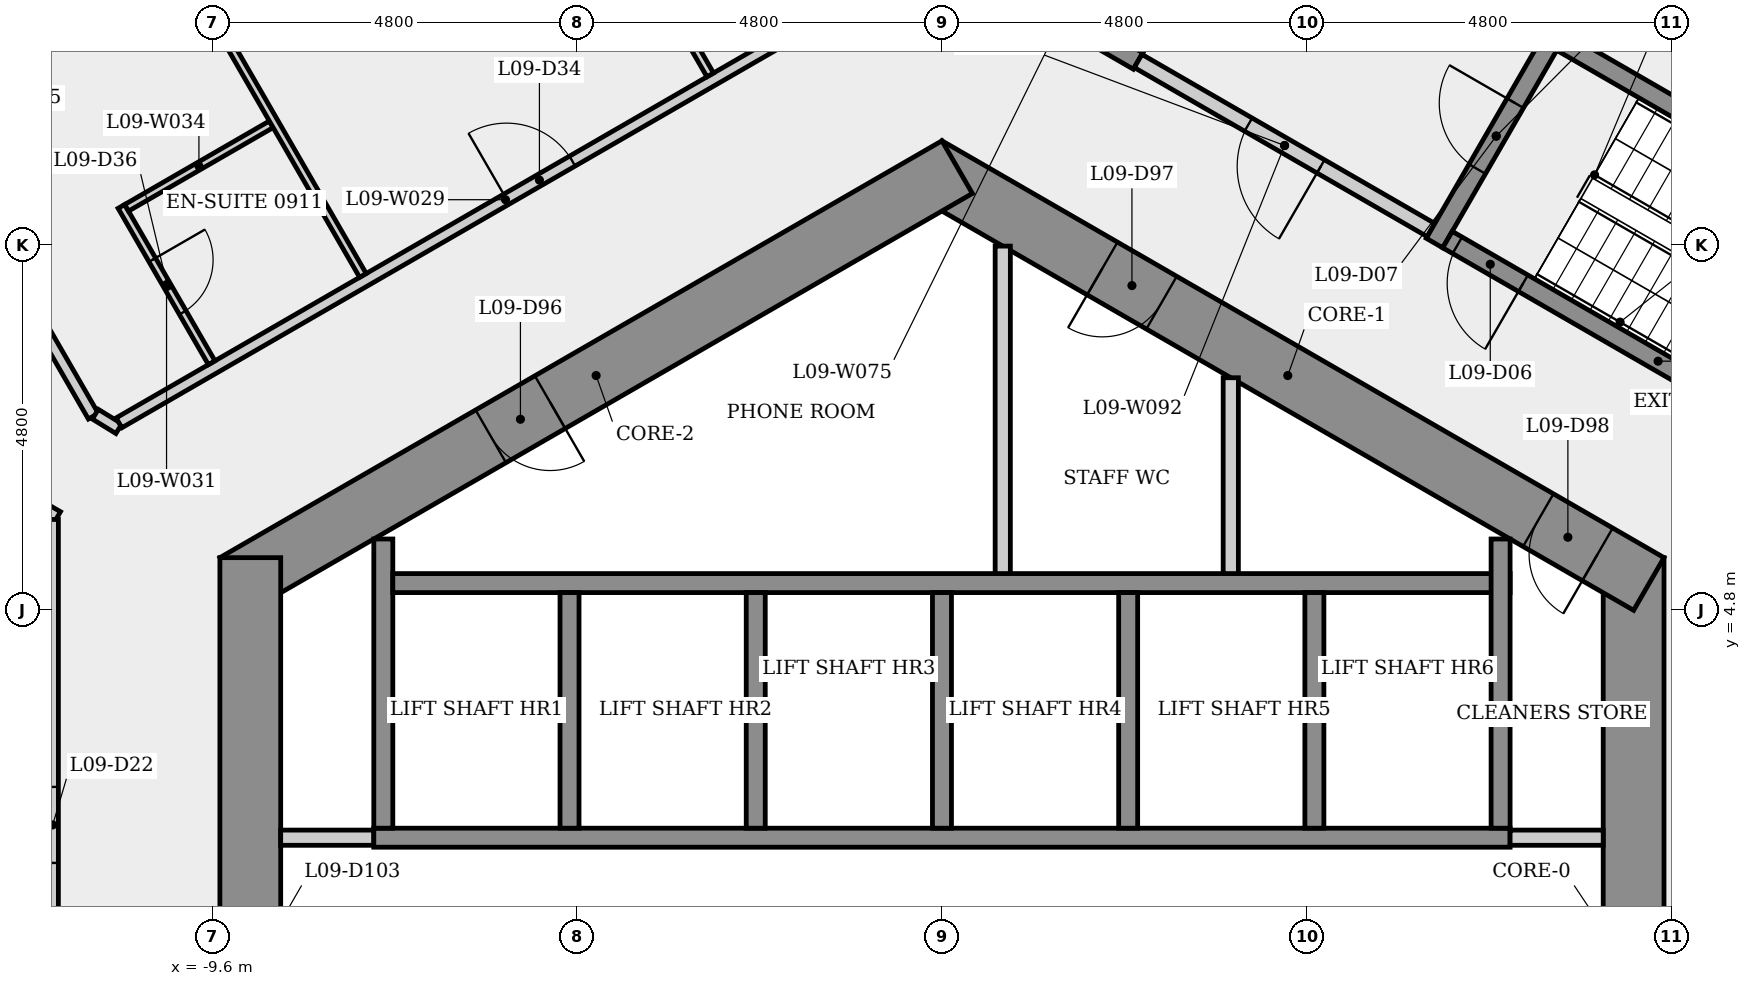
"""IFC4 building model, lengths in metres.
Left out: names, types, materials, properties, quantities, classifications, styles, units other than length and angle.
Written with IfcOpenShell. Run it as: python <this file> out.ifc"""

import sys

from ifc_helpers import new_model, si_unit, direction, frame, frame_2d, origin, place, context, subcontext, project, spatial, rectangle, extrude, element, fill, save


model = new_model("IFC4")
c1 = context("Model", 3, precision=1e-05, world=origin(), true_north=direction((0.0, 1.0)))
c2 = subcontext(c1, "Body", "Model", "MODEL_VIEW")
j1 = project(units=[si_unit("LENGTHUNIT", "METRE"), si_unit("PLANEANGLEUNIT", "RADIAN")], contexts=[c1])
p1 = place(None, origin())
s1 = spatial("IfcSite", under=j1, at=p1, CompositionType="ELEMENT")
p2 = place(p1, origin())
s2 = spatial("IfcBuilding", under=s1, at=p2, CompositionType="ELEMENT")
p3 = place(p2, frame((0.0, 0.0, 39.1)))
s3 = spatial("IfcBuildingStorey", under=s2, at=p3, CompositionType="ELEMENT", Elevation=39.1)
p4 = place(p3, frame((9.1, -5.485, 0.0), z_axis=(0.0, 0.0, 1.0), x_axis=(0.0, 1.0, 0.0)))
e1 = element("IfcWall", 1, at=p4, inside=s3, PredefinedType="SHEAR", context=c2, shape_type="SweptSolid", body=[
    extrude(rectangle(XDim=10.97, YDim=0.8, at=frame_2d((5.485, 0.0))), origin(), (0.0, 0.0, 1.0), 3.4),
])
p5 = place(p4, frame((4.685, 0.0, 0.0)))
e2 = element("IfcOpeningElement", 2, at=p5, cuts=e1, PredefinedType="OPENING", context=c2, shape_type="SweptSolid", body=[
    extrude(rectangle(XDim=1.6, YDim=2.1, at=frame_2d((0.8, 1.05))), frame((0.0, 0.41, 0.0), z_axis=(0.0, -1.0, 0.0), x_axis=(1.0, 0.0, 0.0)), (0.0, 0.0, 1.0), 0.82),
])
p6 = place(p3, frame((9.3, 5.138, 0.0), z_axis=(0.0, 0.0, 1.0), x_axis=(-0.866023993627, 0.500002442456, 0.0)))
e3 = element("IfcWall", 3, at=p6, inside=s3, PredefinedType="SHEAR", context=c2, shape_type="SweptSolid", body=[
    extrude(rectangle(XDim=10.97, YDim=0.8, at=frame_2d((5.485, 0.0))), origin(), (0.0, 0.0, 1.0), 3.4),
])
p7 = place(p6, frame((7.403, 0.0, 0.0)))
e4 = element("IfcOpeningElement", 4, at=p7, cuts=e3, PredefinedType="OPENING", context=c2, shape_type="SweptSolid", body=[
    extrude(rectangle(XDim=0.9, YDim=2.1, at=frame_2d((0.45, 1.05))), frame((0.0, 0.41, 0.0), z_axis=(0.0, -1.0, 0.0), x_axis=(1.0, 0.0, 0.0)), (0.0, 0.0, 1.0), 0.82),
])
p8 = place(p6, frame((0.78, 0.0, 0.0)))
e5 = element("IfcOpeningElement", 5, at=p8, cuts=e3, PredefinedType="OPENING", context=c2, shape_type="SweptSolid", body=[
    extrude(rectangle(XDim=0.9, YDim=2.1, at=frame_2d((0.45, 1.05))), frame((0.0, 0.41, 0.0), z_axis=(0.0, -1.0, 0.0), x_axis=(1.0, 0.0, 0.0)), (0.0, 0.0, 1.0), 0.82),
])
p9 = place(p3, frame((0.2, 10.623, 0.0), z_axis=(0.0, 0.0, 1.0), x_axis=(-0.866023993627, -0.500002442456, 0.0)))
e6 = element("IfcWall", 6, at=p9, inside=s3, PredefinedType="SHEAR", context=c2, shape_type="SweptSolid", body=[
    extrude(rectangle(XDim=10.97, YDim=0.8, at=frame_2d((5.485, 0.0))), origin(), (0.0, 0.0, 1.0), 3.4),
])
p10 = place(p9, frame((6.185, 0.0, 0.0)))
e7 = element("IfcOpeningElement", 7, at=p10, cuts=e6, PredefinedType="OPENING", context=c2, shape_type="SweptSolid", body=[
    extrude(rectangle(XDim=0.9, YDim=2.1, at=frame_2d((0.45, 1.05))), frame((0.0, 0.41, 0.0), z_axis=(0.0, -1.0, 0.0), x_axis=(1.0, 0.0, 0.0)), (0.0, 0.0, 1.0), 0.82),
])
p11 = place(p3, frame((-9.1, 5.485, 0.0), z_axis=(0.0, 0.0, 1.0), x_axis=(0.0, -1.0, 0.0)))
e8 = element("IfcWall", 8, at=p11, inside=s3, PredefinedType="SHEAR", context=c2, shape_type="SweptSolid", body=[
    extrude(rectangle(XDim=10.97, YDim=0.8, at=frame_2d((5.485, 0.0))), origin(), (0.0, 0.0, 1.0), 3.4),
])
p12 = place(p11, frame((4.685, 0.0, 0.0)))
e9 = element("IfcOpeningElement", 9, at=p12, cuts=e8, PredefinedType="OPENING", context=c2, shape_type="SweptSolid", body=[
    extrude(rectangle(XDim=1.6, YDim=2.1, at=frame_2d((0.8, 1.05))), frame((0.0, 0.41, 0.0), z_axis=(0.0, -1.0, 0.0), x_axis=(1.0, 0.0, 0.0)), (0.0, 0.0, 1.0), 0.82),
])
p13 = place(p3, frame((-14.509, 13.138, 0.0), z_axis=(0.0, 0.0, 1.0), x_axis=(0.499975272495, -0.866039679746, 0.0)))
e10 = element("IfcWall", 10, at=p13, inside=s3, PredefinedType="PARTITIONING", context=c2, shape_type="SweptSolid", body=[
    extrude(rectangle(XDim=6.687, YDim=0.15, at=frame_2d((3.344, 0.0))), origin(), (0.0, 0.0, 1.0), 3.05),
])
p14 = place(p13, frame((2.856, 0.0, 0.0)))
e11 = element("IfcOpeningElement", 11, at=p14, cuts=e10, PredefinedType="OPENING", context=c2, shape_type="SweptSolid", body=[
    extrude(rectangle(XDim=0.9, YDim=2.1, at=frame_2d((0.45, 1.05))), frame((0.0, 0.085, 0.0), z_axis=(0.0, -1.0, 0.0), x_axis=(1.0, 0.0, 0.0)), (0.0, 0.0, 1.0), 0.17),
])
p15 = place(p3, frame((-11.635, 6.025, 0.0), z_axis=(0.0, 0.0, 1.0), x_axis=(-0.865949522258, 0.500131407633, 0.0)))
e12 = element("IfcWall", 12, at=p15, inside=s3, PredefinedType="PARTITIONING", context=c2, shape_type="SweptSolid", body=[
    extrude(rectangle(XDim=0.362, YDim=0.15, at=frame_2d((0.181, 0.0))), origin(), (0.0, 0.0, 1.0), 3.05),
])
p16 = place(p3, frame((-11.7, -5.987, 0.0), z_axis=(0.0, 0.0, 1.0), x_axis=(0.0, 1.0, 0.0)))
e13 = element("IfcWall", 13, at=p16, inside=s3, PredefinedType="PARTITIONING", context=c2, shape_type="SweptSolid", body=[
    extrude(rectangle(XDim=11.975, YDim=0.15, at=frame_2d((5.987, 0.0))), origin(), (0.0, 0.0, 1.0), 3.05),
])
p17 = place(p16, frame((7.455, 0.0, 0.0)))
e14 = element("IfcOpeningElement", 14, at=p17, cuts=e13, PredefinedType="OPENING", context=c2, shape_type="SweptSolid", body=[
    extrude(rectangle(XDim=1.0, YDim=2.1, at=frame_2d((0.5, 1.05))), frame((0.0, 0.085, 0.0), z_axis=(0.0, -1.0, 0.0), x_axis=(1.0, 0.0, 0.0)), (0.0, 0.0, 1.0), 0.17),
])
p18 = place(p3, frame((-11.139, 7.372, 0.0), z_axis=(0.0, 0.0, 1.0), x_axis=(0.852601252411, -0.522562057929, 0.0)))
e15 = element("IfcWall", 15, at=p18, inside=s3, PredefinedType="PARTITIONING", context=c2, shape_type="SweptSolid", body=[
    extrude(rectangle(XDim=0.364, YDim=0.15, at=frame_2d((0.182, 0.0))), origin(), (0.0, 0.0, 1.0), 3.05),
])
p19 = place(p3, frame((-10.828, 7.259, 0.0), z_axis=(0.0, 0.0, 1.0), x_axis=(0.866023917287, 0.50000257468, 0.0)))
e16 = element("IfcWall", 16, at=p19, inside=s3, PredefinedType="PARTITIONING", context=c2, shape_type="SweptSolid", body=[
    extrude(rectangle(XDim=11.744, YDim=0.15, at=frame_2d((5.872, 0.0))), origin(), (0.0, 0.0, 1.0), 3.05),
])
p20 = place(p19, frame((5.887, 0.0, 0.0)))
e17 = element("IfcOpeningElement", 17, at=p20, cuts=e16, PredefinedType="OPENING", context=c2, shape_type="SweptSolid", body=[
    extrude(rectangle(XDim=1.0, YDim=2.1, at=frame_2d((0.5, 1.05))), frame((0.0, 0.085, 0.0), z_axis=(0.0, -1.0, 0.0), x_axis=(1.0, 0.0, 0.0)), (0.0, 0.0, 1.0), 0.17),
])
p21 = place(p3, frame((-10.796, 10.106, 0.0), z_axis=(0.0, 0.0, 1.0), x_axis=(0.499986429846, -0.866033238375, 0.0)))
e18 = element("IfcWall", 18, at=p21, inside=s3, PredefinedType="PARTITIONING", context=c2, shape_type="SweptSolid", body=[
    extrude(rectangle(XDim=2.375, YDim=0.1, at=frame_2d((1.188, 0.0))), origin(), (0.0, 0.0, 1.0), 3.05),
])
p22 = place(p21, frame((0.812, 0.0, 0.0)))
e19 = element("IfcOpeningElement", 19, at=p22, cuts=e18, PredefinedType="OPENING", context=c2, shape_type="SweptSolid", body=[
    extrude(rectangle(XDim=0.8, YDim=2.1, at=frame_2d((0.4, 1.05))), frame((0.0, 0.06, 0.0), z_axis=(0.0, -1.0, 0.0), x_axis=(1.0, 0.0, 0.0)), (0.0, 0.0, 1.0), 0.12),
])
p23 = place(p3, frame((-8.824, 11.187, 0.0), z_axis=(0.0, 0.0, 1.0), x_axis=(-0.866046828231, -0.499962889934, 0.0)))
e20 = element("IfcWall", 20, at=p23, inside=s3, PredefinedType="PARTITIONING", context=c2, shape_type="SweptSolid", body=[
    extrude(rectangle(XDim=2.198, YDim=0.1, at=frame_2d((1.099, 0.0))), origin(), (0.0, 0.0, 1.0), 3.05),
])
p24 = place(p3, frame((-12.123, 17.0, 0.0), z_axis=(0.0, 0.0, 1.0), x_axis=(0.500009404554, -0.866019973994, 0.0)))
e21 = element("IfcWall", 21, at=p24, inside=s3, PredefinedType="PARTITIONING", context=c2, shape_type="SweptSolid", body=[
    extrude(rectangle(XDim=9.01, YDim=0.1, at=frame_2d((4.505, 0.0))), origin(), (0.0, 0.0, 1.0), 3.05),
])
p25 = place(p3, frame((-8.7, 1.8, 0.0), z_axis=(0.0, 0.0, 1.0), x_axis=(1.0, 0.0, 0.0)))
e22 = element("IfcWall", 22, at=p25, inside=s3, PredefinedType="PARTITIONING", context=c2, shape_type="SweptSolid", body=[
    extrude(rectangle(XDim=1.225, YDim=0.2, at=frame_2d((0.613, 0.0))), origin(), (0.0, 0.0, 1.0), 3.05),
])
p26 = place(p3, frame((-7.475, 1.8, 0.0), z_axis=(0.0, 0.0, 1.0), x_axis=(1.0, 0.0, 0.0)))
e23 = element("IfcWall", 23, at=p26, inside=s3, PredefinedType="SHEAR", context=c2, shape_type="SweptSolid", body=[
    extrude(rectangle(XDim=14.95, YDim=0.25, at=frame_2d((7.475, 0.0))), origin(), (0.0, 0.0, 1.0), 3.05),
])
p27 = place(p3, frame((-7.35, 1.925, 0.0), z_axis=(0.0, 0.0, 1.0), x_axis=(0.0, 1.0, 0.0)))
e24 = element("IfcWall", 24, at=p27, inside=s3, PredefinedType="SHEAR", context=c2, shape_type="SweptSolid", body=[
    extrude(rectangle(XDim=3.805, YDim=0.25, at=frame_2d((1.903, 0.0))), origin(), (0.0, 0.0, 1.0), 3.05),
])
p28 = place(p3, frame((-7.225, 5.15, 0.0), z_axis=(0.0, 0.0, 1.0), x_axis=(1.0, 0.0, 0.0)))
e25 = element("IfcWall", 25, at=p28, inside=s3, PredefinedType="SHEAR", context=c2, shape_type="SweptSolid", body=[
    extrude(rectangle(XDim=14.7, YDim=0.25, at=frame_2d((7.35, 0.0))), origin(), (0.0, 0.0, 1.0), 3.05),
])
p29 = place(p3, frame((-4.9, 5.025, 0.0), z_axis=(0.0, 0.0, 1.0), x_axis=(0.0, -1.0, 0.0)))
e26 = element("IfcWall", 26, at=p29, inside=s3, PredefinedType="SHEAR", context=c2, shape_type="SweptSolid", body=[
    extrude(rectangle(XDim=3.1, YDim=0.25, at=frame_2d((1.55, 0.0))), origin(), (0.0, 0.0, 1.0), 3.4),
])
p30 = place(p3, frame((-3.049, 11.836, 0.0), z_axis=(0.0, 0.0, 1.0), x_axis=(-0.500018000043, 0.866015011206, 0.0)))
e27 = element("IfcWall", 27, at=p30, inside=s3, PredefinedType="PARTITIONING", context=c2, shape_type="SweptSolid", body=[
    extrude(rectangle(XDim=9.606, YDim=0.1, at=frame_2d((4.803, 0.0))), origin(), (0.0, 0.0, 1.0), 3.05),
])
for number, where, z_axis, x_axis in (
    (28, (-2.45, 5.025, 0.0), (0.0, 0.0, 1.0), (0.0, -1.0, 0.0)),
    (29, (0.0, 5.025, 0.0), (0.0, 0.0, 1.0), (0.0, -1.0, 0.0)),
):
    element("IfcWall", number, at=place(p3, frame(where, z_axis=z_axis, x_axis=x_axis)), inside=s3, PredefinedType="SHEAR", context=c2, shape_type="SweptSolid", body=[
        extrude(rectangle(XDim=3.1, YDim=0.25, at=frame_2d((1.55, 0.0))), origin(), (0.0, 0.0, 1.0), 3.4),
    ])
p31 = place(p3, frame((0.8, 9.584, 0.0), z_axis=(0.0, 0.0, 1.0), x_axis=(0.0, -1.0, 0.0)))
e30 = element("IfcWall", 30, at=p31, inside=s3, PredefinedType="PARTITIONING", context=c2, shape_type="SweptSolid", body=[
    extrude(rectangle(XDim=4.309, YDim=0.2, at=frame_2d((2.155, 0.0))), origin(), (0.0, 0.0, 1.0), 3.05),
])
p32 = place(p3, frame((2.45, 5.025, 0.0), z_axis=(0.0, 0.0, 1.0), x_axis=(0.0, -1.0, 0.0)))
e31 = element("IfcWall", 31, at=p32, inside=s3, PredefinedType="SHEAR", context=c2, shape_type="SweptSolid", body=[
    extrude(rectangle(XDim=3.1, YDim=0.25, at=frame_2d((1.55, 0.0))), origin(), (0.0, 0.0, 1.0), 3.4),
])
p33 = place(p3, frame((2.581, 12.02, 0.0), z_axis=(0.0, 0.0, 1.0), x_axis=(-0.86603892542, 0.499976579108, 0.0)))
e32 = element("IfcWall", 32, at=p33, inside=s3, PredefinedType="SHEAR", context=c2, shape_type="SweptSolid", body=[
    extrude(rectangle(XDim=2.162, YDim=0.25, at=frame_2d((1.081, 0.0))), origin(), (0.0, 0.0, 1.0), 3.05),
])
p34 = place(p3, frame((2.535, 12.191, 0.0), z_axis=(0.0, 0.0, 1.0), x_axis=(0.500061746146, 0.865989751695, 0.0)))
e33 = element("IfcWall", 33, at=p34, inside=s3, PredefinedType="SHEAR", context=c2, shape_type="SweptSolid", body=[
    extrude(rectangle(XDim=2.45, YDim=0.25, at=frame_2d((1.225, 0.0))), origin(), (0.0, 0.0, 1.0), 3.4),
])
p35 = place(p34, frame((0.675, 0.0, 0.0)))
e34 = element("IfcOpeningElement", 34, at=p35, cuts=e33, PredefinedType="OPENING", context=c2, shape_type="SweptSolid", body=[
    extrude(rectangle(XDim=1.1, YDim=2.1, at=frame_2d((0.55, 1.05))), frame((0.0, 0.135, 0.0), z_axis=(0.0, -1.0, 0.0), x_axis=(1.0, 0.0, 0.0)), (0.0, 0.0, 1.0), 0.27),
])
p36 = place(p3, frame((3.8, 7.852, 0.0), z_axis=(0.0, 0.0, 1.0), x_axis=(0.0, -1.0, 0.0)))
e35 = element("IfcWall", 35, at=p36, inside=s3, PredefinedType="PARTITIONING", context=c2, shape_type="SweptSolid", body=[
    extrude(rectangle(XDim=2.577, YDim=0.2, at=frame_2d((1.289, 0.0))), origin(), (0.0, 0.0, 1.0), 3.05),
])
p37 = place(p3, frame((4.9, 5.025, 0.0), z_axis=(0.0, 0.0, 1.0), x_axis=(0.0, -1.0, 0.0)))
e36 = element("IfcWall", 36, at=p37, inside=s3, PredefinedType="SHEAR", context=c2, shape_type="SweptSolid", body=[
    extrude(rectangle(XDim=3.1, YDim=0.25, at=frame_2d((1.55, 0.0))), origin(), (0.0, 0.0, 1.0), 3.4),
])
p38 = place(p3, frame((6.435, 9.795, 0.0), z_axis=(0.0, 0.0, 1.0), x_axis=(-0.866012907634, 0.500021643343, 0.0)))
e37 = element("IfcWall", 37, at=p38, inside=s3, PredefinedType="PARTITIONING", context=c2, shape_type="SweptSolid", body=[
    extrude(rectangle(XDim=4.45, YDim=0.2, at=frame_2d((2.225, 0.0))), origin(), (0.0, 0.0, 1.0), 3.05),
])
p39 = place(p38, frame((1.675, 0.0, 0.0)))
e38 = element("IfcOpeningElement", 38, at=p39, cuts=e37, PredefinedType="OPENING", context=c2, shape_type="SweptSolid", body=[
    extrude(rectangle(XDim=1.1, YDim=2.1, at=frame_2d((0.55, 1.05))), frame((0.0, 0.11, 0.0), z_axis=(0.0, -1.0, 0.0), x_axis=(1.0, 0.0, 0.0)), (0.0, 0.0, 1.0), 0.22),
])
p40 = place(p3, frame((6.48, 9.624, 0.0), z_axis=(0.0, 0.0, 1.0), x_axis=(0.500017246033, 0.866015446554, 0.0)))
e39 = element("IfcWall", 39, at=p40, inside=s3, PredefinedType="SHEAR", context=c2, shape_type="SweptSolid", body=[
    extrude(rectangle(XDim=3.25, YDim=0.25, at=frame_2d((1.625, 0.0))), origin(), (0.0, 0.0, 1.0), 3.05),
])
p41 = place(p40, frame((1.125, 0.0, 0.0)))
e40 = element("IfcOpeningElement", 40, at=p41, cuts=e39, PredefinedType="OPENING", context=c2, shape_type="SweptSolid", body=[
    extrude(rectangle(XDim=1.0, YDim=2.1, at=frame_2d((0.5, 1.05))), frame((0.0, 0.135, 0.0), z_axis=(0.0, -1.0, 0.0), x_axis=(1.0, 0.0, 0.0)), (0.0, 0.0, 1.0), 0.27),
])
p42 = place(p3, frame((7.475, 1.8, 0.0), z_axis=(0.0, 0.0, 1.0), x_axis=(1.0, 0.0, 0.0)))
e41 = element("IfcWall", 41, at=p42, inside=s3, PredefinedType="PARTITIONING", context=c2, shape_type="SweptSolid", body=[
    extrude(rectangle(XDim=1.225, YDim=0.2, at=frame_2d((0.613, 0.0))), origin(), (0.0, 0.0, 1.0), 3.05),
])
p43 = place(p3, frame((7.35, 5.73, 0.0), z_axis=(0.0, 0.0, 1.0), x_axis=(0.0, -1.0, 0.0)))
e42 = element("IfcWall", 42, at=p43, inside=s3, PredefinedType="SHEAR", context=c2, shape_type="SweptSolid", body=[
    extrude(rectangle(XDim=3.805, YDim=0.25, at=frame_2d((1.903, 0.0))), origin(), (0.0, 0.0, 1.0), 3.05),
])
p44 = place(p3, frame((8.151, 12.268, 0.0), z_axis=(0.0, 0.0, 1.0), x_axis=(0.866025499775, -0.499999833739, 0.0)))
e43 = element("IfcWall", 43, at=p44, inside=s3, PredefinedType="SHEAR", context=c2, shape_type="SweptSolid", body=[
    extrude(rectangle(XDim=6.4, YDim=0.25, at=frame_2d((3.2, 0.0))), origin(), (0.0, 0.0, 1.0), 3.05),
])
p45 = place(p3, frame((12.194, 6.47, 0.0), z_axis=(0.0, 0.0, 1.0), x_axis=(-0.866025499775, 0.499999833739, 0.0)))
e44 = element("IfcWall", 44, at=p45, inside=s3, PredefinedType="SHEAR", context=c2, shape_type="SweptSolid", body=[
    extrude(rectangle(XDim=6.4, YDim=0.25, at=frame_2d((3.2, 0.0))), origin(), (0.0, 0.0, 1.0), 3.05),
])
p46 = place(p45, frame((5.25, 0.0, 0.0)))
e45 = element("IfcOpeningElement", 45, at=p46, cuts=e44, PredefinedType="OPENING", context=c2, shape_type="SweptSolid", body=[
    extrude(rectangle(XDim=1.0, YDim=2.1, at=frame_2d((0.5, 1.05))), frame((0.0, 0.135, 0.0), z_axis=(0.0, -1.0, 0.0), x_axis=(1.0, 0.0, 0.0)), (0.0, 0.0, 1.0), 0.27),
])
p47 = place(p46, origin())
e46 = element("IfcDoor", 46, at=p47, inside=s3, OperationType="SINGLE_SWING_LEFT", PredefinedType="DOOR", context=c2, shape_type="SweptSolid", body=[
    extrude(rectangle(XDim=1.0, YDim=2.1, at=frame_2d((0.5, 1.05))), frame((0.0, 0.025, 0.0), z_axis=(0.0, -1.0, 0.0), x_axis=(1.0, 0.0, 0.0)), (0.0, 0.0, 1.0), 0.05),
])
fill(e45, e46)
p48 = place(p41, origin())
e47 = element("IfcDoor", 47, at=p48, inside=s3, OperationType="SINGLE_SWING_RIGHT", PredefinedType="DOOR", context=c2, shape_type="SweptSolid", body=[
    extrude(rectangle(XDim=1.0, YDim=2.1, at=frame_2d((0.5, 1.05))), frame((0.0, 0.025, 0.0), z_axis=(0.0, -1.0, 0.0), x_axis=(1.0, 0.0, 0.0)), (0.0, 0.0, 1.0), 0.05),
])
fill(e40, e47)
p49 = place(p39, origin())
e48 = element("IfcDoor", 48, at=p49, inside=s3, OperationType="SINGLE_SWING_LEFT", PredefinedType="DOOR", context=c2, shape_type="SweptSolid", body=[
    extrude(rectangle(XDim=1.1, YDim=2.1, at=frame_2d((0.55, 1.05))), frame((0.0, 0.025, 0.0), z_axis=(0.0, -1.0, 0.0), x_axis=(1.0, 0.0, 0.0)), (0.0, 0.0, 1.0), 0.05),
])
fill(e38, e48)
p50 = place(p17, origin())
e49 = element("IfcDoor", 49, at=p50, inside=s3, OperationType="SINGLE_SWING_LEFT", PredefinedType="DOOR", context=c2, shape_type="SweptSolid", body=[
    extrude(rectangle(XDim=1.0, YDim=2.1, at=frame_2d((0.5, 1.05))), frame((0.0, 0.025, 0.0), z_axis=(0.0, -1.0, 0.0), x_axis=(1.0, 0.0, 0.0)), (0.0, 0.0, 1.0), 0.05),
])
fill(e14, e49)
p51 = place(p20, origin())
e50 = element("IfcDoor", 50, at=p51, inside=s3, OperationType="SINGLE_SWING_LEFT", PredefinedType="DOOR", context=c2, shape_type="SweptSolid", body=[
    extrude(rectangle(XDim=1.0, YDim=2.1, at=frame_2d((0.5, 1.05))), frame((0.0, 0.025, 0.0), z_axis=(0.0, -1.0, 0.0), x_axis=(1.0, 0.0, 0.0)), (0.0, 0.0, 1.0), 0.05),
])
fill(e17, e50)
p52 = place(p22, origin())
e51 = element("IfcDoor", 51, at=p52, inside=s3, OperationType="SINGLE_SWING_LEFT", PredefinedType="DOOR", context=c2, shape_type="SweptSolid", body=[
    extrude(rectangle(XDim=0.8, YDim=2.1, at=frame_2d((0.4, 1.05))), frame((0.0, 0.025, 0.0), z_axis=(0.0, -1.0, 0.0), x_axis=(1.0, 0.0, 0.0)), (0.0, 0.0, 1.0), 0.05),
])
fill(e19, e51)
p53 = place(p10, origin())
e52 = element("IfcDoor", 52, at=p53, inside=s3, OperationType="SINGLE_SWING_LEFT", PredefinedType="DOOR", context=c2, shape_type="SweptSolid", body=[
    extrude(rectangle(XDim=0.9, YDim=2.1, at=frame_2d((0.45, 1.05))), frame((0.0, 0.025, 0.0), z_axis=(0.0, -1.0, 0.0), x_axis=(1.0, 0.0, 0.0)), (0.0, 0.0, 1.0), 0.05),
])
fill(e7, e52)
p54 = place(p7, origin())
e53 = element("IfcDoor", 53, at=p54, inside=s3, OperationType="SINGLE_SWING_RIGHT", PredefinedType="DOOR", context=c2, shape_type="SweptSolid", body=[
    extrude(rectangle(XDim=0.9, YDim=2.1, at=frame_2d((0.45, 1.05))), frame((0.0, 0.025, 0.0), z_axis=(0.0, -1.0, 0.0), x_axis=(1.0, 0.0, 0.0)), (0.0, 0.0, 1.0), 0.05),
])
fill(e4, e53)
p55 = place(p8, origin())
e54 = element("IfcDoor", 54, at=p55, inside=s3, OperationType="SINGLE_SWING_LEFT", PredefinedType="DOOR", context=c2, shape_type="SweptSolid", body=[
    extrude(rectangle(XDim=0.9, YDim=2.1, at=frame_2d((0.45, 1.05))), frame((0.0, 0.025, 0.0), z_axis=(0.0, -1.0, 0.0), x_axis=(1.0, 0.0, 0.0)), (0.0, 0.0, 1.0), 0.05),
])
fill(e5, e54)
save(model, sys.argv[1])
